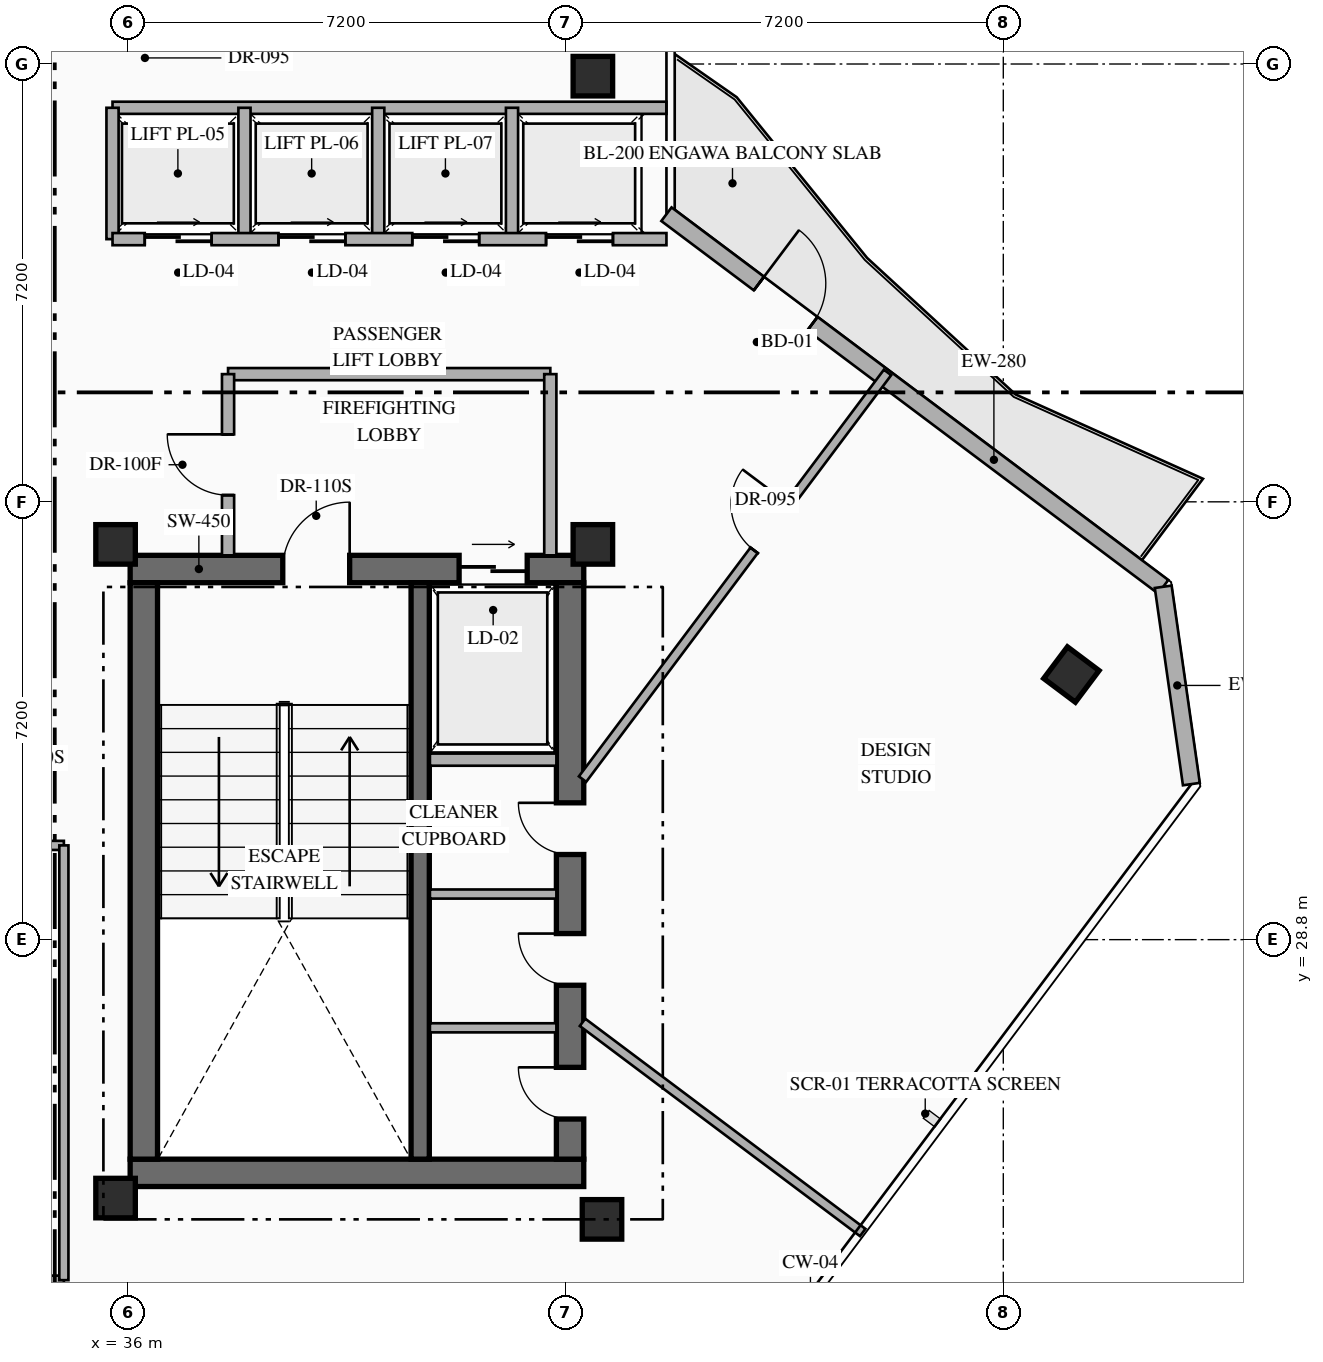
"""IFC4 building model, lengths in metres.
Left out: names, types, materials, properties, quantities, classifications, styles, units other than length and angle.
Written with IfcOpenShell. Run it as: python <this file> out.ifc"""

import sys

from ifc_helpers import new_model, si_unit, direction, frame, frame_2d, origin, origin_2d, place, context, subcontext, project, spatial, rectangle, hollow_rectangle, extrude, element, fill, save


model = new_model("IFC4")
c1 = context("Model", 3, precision=1e-05, world=origin(), true_north=direction((0.0, 1.0)))
c2 = subcontext(c1, "Body", "Model", "MODEL_VIEW")
j1 = project(units=[si_unit("LENGTHUNIT", "METRE"), si_unit("PLANEANGLEUNIT", "RADIAN")], contexts=[c1])
p1 = place(None, origin())
s1 = spatial("IfcSite", under=j1, at=p1, CompositionType="ELEMENT")
p2 = place(p1, origin())
s2 = spatial("IfcBuilding", under=s1, at=p2, CompositionType="ELEMENT")
p3 = place(p2, frame((0.0, 0.0, 250.35)))
s3 = spatial("IfcBuildingStorey", under=s2, at=p3, CompositionType="ELEMENT", Elevation=250.35)
p4 = place(p3, frame((36.04, 24.965, 0.0), z_axis=(0.0, 0.0, 1.0), x_axis=(1.0, 0.0, 0.0)))
e1 = element("IfcWall", 1, at=p4, inside=s3, PredefinedType="SHEAR", context=c2, shape_type="SweptSolid", body=[
    extrude(rectangle(XDim=7.46, YDim=0.45, at=frame_2d((3.73, 0.0))), origin(), (0.0, 0.0, 1.0), 3.6),
])
p5 = place(p3, frame((36.04, 34.895, 0.0), z_axis=(0.0, 0.0, 1.0), x_axis=(1.0, 0.0, 0.0)))
e2 = element("IfcWall", 2, at=p5, inside=s3, PredefinedType="SHEAR", context=c2, shape_type="SweptSolid", body=[
    extrude(rectangle(XDim=7.46, YDim=0.45, at=frame_2d((3.73, 0.0))), origin(), (0.0, 0.0, 1.0), 3.6),
])
p6 = place(p5, frame((2.51, 0.0, 0.0)))
e3 = element("IfcOpeningElement", 3, at=p6, cuts=e2, PredefinedType="OPENING", context=c2, shape_type="SweptSolid", body=[
    extrude(rectangle(XDim=1.1, YDim=2.2, at=frame_2d((0.55, 1.1))), frame((0.0, 0.235, 0.0), z_axis=(0.0, -1.0, 0.0), x_axis=(1.0, 0.0, 0.0)), (0.0, 0.0, 1.0), 0.47),
])
p7 = place(p5, frame((5.41, 0.0, 0.0)))
e4 = element("IfcOpeningElement", 4, at=p7, cuts=e2, PredefinedType="OPENING", context=c2, shape_type="SweptSolid", body=[
    extrude(rectangle(XDim=1.12, YDim=2.15, at=frame_2d((0.56, 1.075))), frame((0.0, 0.235, 0.0), z_axis=(0.0, -1.0, 0.0), x_axis=(1.0, 0.0, 0.0)), (0.0, 0.0, 1.0), 0.47),
])
p8 = place(p3, frame((36.265, 25.19, 0.0), z_axis=(0.0, 0.0, 1.0), x_axis=(0.0, 1.0, 0.0)))
e5 = element("IfcWall", 5, at=p8, inside=s3, PredefinedType="SHEAR", context=c2, shape_type="SweptSolid", body=[
    extrude(rectangle(XDim=9.48, YDim=0.45, at=frame_2d((4.74, 0.0))), origin(), (0.0, 0.0, 1.0), 3.6),
])
p9 = place(p3, frame((43.275, 25.19, 0.0), z_axis=(0.0, 0.0, 1.0), x_axis=(0.0, 1.0, 0.0)))
e6 = element("IfcWall", 6, at=p9, inside=s3, PredefinedType="SHEAR", context=c2, shape_type="SweptSolid", body=[
    extrude(rectangle(XDim=9.48, YDim=0.45, at=frame_2d((4.74, 0.0))), origin(), (0.0, 0.0, 1.0), 3.6),
])
p10 = place(p9, frame((0.66, 0.0, 0.0)))
e7 = element("IfcOpeningElement", 7, at=p10, cuts=e6, PredefinedType="OPENING", context=c2, shape_type="SweptSolid", body=[
    extrude(rectangle(XDim=0.85, YDim=2.08, at=frame_2d((0.425, 1.04))), frame((0.0, 0.235, 0.0), z_axis=(0.0, -1.0, 0.0), x_axis=(1.0, 0.0, 0.0)), (0.0, 0.0, 1.0), 0.47),
])
p11 = place(p9, frame((2.86, 0.0, 0.0)))
e8 = element("IfcOpeningElement", 8, at=p11, cuts=e6, PredefinedType="OPENING", context=c2, shape_type="SweptSolid", body=[
    extrude(rectangle(XDim=0.85, YDim=2.08, at=frame_2d((0.425, 1.04))), frame((0.0, 0.235, 0.0), z_axis=(0.0, -1.0, 0.0), x_axis=(1.0, 0.0, 0.0)), (0.0, 0.0, 1.0), 0.47),
])
p12 = place(p9, frame((5.01, 0.0, 0.0)))
e9 = element("IfcOpeningElement", 9, at=p12, cuts=e6, PredefinedType="OPENING", context=c2, shape_type="SweptSolid", body=[
    extrude(rectangle(XDim=0.85, YDim=2.08, at=frame_2d((0.425, 1.04))), frame((0.0, 0.235, 0.0), z_axis=(0.0, -1.0, 0.0), x_axis=(1.0, 0.0, 0.0)), (0.0, 0.0, 1.0), 0.47),
])
p13 = place(p3, frame((40.81, 25.19, 0.0), z_axis=(0.0, 0.0, 1.0), x_axis=(0.0, 1.0, 0.0)))
e10 = element("IfcWall", 10, at=p13, inside=s3, PredefinedType="SHEAR", context=c2, shape_type="SweptSolid", body=[
    extrude(rectangle(XDim=9.48, YDim=0.3, at=frame_2d((4.74, 0.0))), origin(), (0.0, 0.0, 1.0), 3.6),
])
for number, where, z_axis, x_axis in (
    (11, (35.8, 24.55, 0.0), (0.0, 0.0, 1.0), (1.0, 0.0, 0.0)),
    (12, (43.8, 24.2, 0.0), (0.0, 0.0, 1.0), (1.0, 0.0, 0.0)),
    (13, (35.8, 35.3, 0.0), (0.0, 0.0, 1.0), (1.0, 0.0, 0.0)),
    (14, (43.65, 35.3, 0.0), (0.0, 0.0, 1.0), (1.0, 0.0, 0.0)),
    (15, (43.65, 43.0, 0.0), (0.0, 0.0, 1.0), (1.0, 0.0, 0.0)),
    (16, (51.52, 33.16, 0.0), (0.0, 0.0, 1.0), (0.8, -0.6, 0.0)),
):
    element("IfcColumn", number, at=place(p3, frame(where, z_axis=z_axis, x_axis=x_axis)), inside=s3, PredefinedType="COLUMN", context=c2, shape_type="SweptSolid", body=[
        extrude(hollow_rectangle(XDim=0.65, YDim=0.65, WallThickness=0.025, at=origin_2d()), origin(), (0.0, 0.0, 1.0), 3.6),
    ])
p14 = place(p3, frame((44.86, 40.73, 0.0), z_axis=(0.0, 0.0, 1.0), x_axis=(0.800022950109, -0.599969398635, 0.0)))
e17 = element("IfcWall", 17, at=p14, inside=s3, PredefinedType="STANDARD", context=c2, shape_type="SweptSolid", body=[
    extrude(rectangle(XDim=10.212, YDim=0.28, at=frame_2d((5.106, 0.0))), origin(), (0.0, 0.0, 1.0), 3.35),
])
p15 = place(p14, frame((1.901, 0.0, 0.0)))
e18 = element("IfcOpeningElement", 18, at=p15, cuts=e17, PredefinedType="OPENING", context=c2, shape_type="SweptSolid", body=[
    extrude(rectangle(XDim=1.1, YDim=2.2, at=frame_2d((0.55, 1.1))), frame((0.0, 0.15, 0.0), z_axis=(0.0, -1.0, 0.0), x_axis=(1.0, 0.0, 0.0)), (0.0, 0.0, 1.0), 0.3),
])
p16 = place(p3, frame((53.03, 34.603, 0.0), z_axis=(0.0, 0.0, 1.0), x_axis=(0.141212810973, -0.989979263428, 0.0)))
e19 = element("IfcWall", 19, at=p16, inside=s3, PredefinedType="STANDARD", context=c2, shape_type="SweptSolid", body=[
    extrude(rectangle(XDim=3.278, YDim=0.28, at=frame_2d((1.639, 0.0))), origin(), (0.0, 0.0, 1.0), 3.35),
])
p17 = place(p3, frame((40.97, 31.76, 0.0), z_axis=(0.0, 0.0, 1.0), x_axis=(1.0, 0.0, 0.0)))
e20 = element("IfcWall", 20, at=p17, inside=s3, PredefinedType="STANDARD", context=c2, shape_type="SweptSolid", body=[
    extrude(rectangle(XDim=2.08, YDim=0.2, at=frame_2d((1.04, 0.0))), origin(), (0.0, 0.0, 1.0), 3.35),
])
for number, where, z_axis, x_axis in (
    (21, (40.97, 27.35, 0.0), (0.0, 0.0, 1.0), (1.0, 0.0, 0.0)),
    (22, (40.97, 29.55, 0.0), (0.0, 0.0, 1.0), (1.0, 0.0, 0.0)),
):
    element("IfcWall", number, at=place(p3, frame(where, z_axis=z_axis, x_axis=x_axis)), inside=s3, PredefinedType="PARTITIONING", context=c2, shape_type="SweptSolid", body=[
        extrude(rectangle(XDim=2.08, YDim=0.15, at=frame_2d((1.04, 0.0))), origin(), (0.0, 0.0, 1.0), 3.35),
    ])
p18 = place(p3, frame((37.65, 38.1, 0.0), z_axis=(0.0, 0.0, 1.0), x_axis=(1.0, 0.0, 0.0)))
e23 = element("IfcWall", 23, at=p18, inside=s3, PredefinedType="STANDARD", context=c2, shape_type="SweptSolid", body=[
    extrude(rectangle(XDim=5.3, YDim=0.2, at=frame_2d((2.65, 0.0))), origin(), (0.0, 0.0, 1.0), 3.35),
])
p19 = place(p3, frame((42.95, 35.12, 0.0), z_axis=(0.0, 0.0, 1.0), x_axis=(0.0, 1.0, 0.0)))
e24 = element("IfcWall", 24, at=p19, inside=s3, PredefinedType="STANDARD", context=c2, shape_type="SweptSolid", body=[
    extrude(rectangle(XDim=2.98, YDim=0.2, at=frame_2d((1.49, 0.0))), origin(), (0.0, 0.0, 1.0), 3.35),
])
p20 = place(p3, frame((37.65, 35.12, 0.0), z_axis=(0.0, 0.0, 1.0), x_axis=(0.0, 1.0, 0.0)))
e25 = element("IfcWall", 25, at=p20, inside=s3, PredefinedType="STANDARD", context=c2, shape_type="SweptSolid", body=[
    extrude(rectangle(XDim=2.98, YDim=0.2, at=frame_2d((1.49, 0.0))), origin(), (0.0, 0.0, 1.0), 3.35),
])
p21 = place(p20, frame((0.99, 0.0, 0.0)))
e26 = element("IfcOpeningElement", 26, at=p21, cuts=e25, PredefinedType="OPENING", context=c2, shape_type="SweptSolid", body=[
    extrude(rectangle(XDim=1.0, YDim=2.2, at=frame_2d((0.5, 1.1))), frame((0.0, 0.11, 0.0), z_axis=(0.0, -1.0, 0.0), x_axis=(1.0, 0.0, 0.0)), (0.0, 0.0, 1.0), 0.22),
])
p22 = place(p3, frame((35.75, 42.48, 0.0), z_axis=(0.0, 0.0, 1.0), x_axis=(1.0, 0.0, 0.0)))
e27 = element("IfcWall", 27, at=p22, inside=s3, PredefinedType="STANDARD", context=c2, shape_type="SweptSolid", body=[
    extrude(rectangle(XDim=9.11, YDim=0.2, at=frame_2d((4.555, 0.0))), origin(), (0.0, 0.0, 1.0), 3.35),
])
for number, where, z_axis, x_axis in (
    (28, (35.75, 40.32, 0.0), (0.0, 0.0, 1.0), (0.0, 1.0, 0.0)),
    (29, (37.92, 40.32, 0.0), (0.0, 0.0, 1.0), (0.0, 1.0, 0.0)),
    (30, (40.12, 40.32, 0.0), (0.0, 0.0, 1.0), (0.0, 1.0, 0.0)),
    (31, (42.32, 40.32, 0.0), (0.0, 0.0, 1.0), (0.0, 1.0, 0.0)),
):
    element("IfcWall", number, at=place(p3, frame(where, z_axis=z_axis, x_axis=x_axis)), inside=s3, PredefinedType="STANDARD", context=c2, shape_type="SweptSolid", body=[
        extrude(rectangle(XDim=2.16, YDim=0.2, at=frame_2d((1.08, 0.0))), origin(), (0.0, 0.0, 1.0), 3.35),
    ])
p23 = place(p3, frame((35.75, 40.32, 0.0), z_axis=(0.0, 0.0, 1.0), x_axis=(1.0, 0.0, 0.0)))
e32 = element("IfcWall", 32, at=p23, inside=s3, PredefinedType="STANDARD", context=c2, shape_type="SweptSolid", body=[
    extrude(rectangle(XDim=9.11, YDim=0.2, at=frame_2d((4.555, 0.0))), origin(), (0.0, 0.0, 1.0), 3.35),
])
p24 = place(p23, frame((0.53, 0.0, 0.0)))
e33 = element("IfcOpeningElement", 33, at=p24, cuts=e32, PredefinedType="OPENING", context=c2, shape_type="SweptSolid", body=[
    extrude(rectangle(XDim=1.1, YDim=2.18, at=frame_2d((0.55, 1.09))), frame((0.0, 0.11, 0.0), z_axis=(0.0, -1.0, 0.0), x_axis=(1.0, 0.0, 0.0)), (0.0, 0.0, 1.0), 0.22),
])
p25 = place(p23, frame((2.73, 0.0, 0.0)))
e34 = element("IfcOpeningElement", 34, at=p25, cuts=e32, PredefinedType="OPENING", context=c2, shape_type="SweptSolid", body=[
    extrude(rectangle(XDim=1.1, YDim=2.18, at=frame_2d((0.55, 1.09))), frame((0.0, 0.11, 0.0), z_axis=(0.0, -1.0, 0.0), x_axis=(1.0, 0.0, 0.0)), (0.0, 0.0, 1.0), 0.22),
])
p26 = place(p23, frame((4.93, 0.0, 0.0)))
e35 = element("IfcOpeningElement", 35, at=p26, cuts=e32, PredefinedType="OPENING", context=c2, shape_type="SweptSolid", body=[
    extrude(rectangle(XDim=1.1, YDim=2.18, at=frame_2d((0.55, 1.09))), frame((0.0, 0.11, 0.0), z_axis=(0.0, -1.0, 0.0), x_axis=(1.0, 0.0, 0.0)), (0.0, 0.0, 1.0), 0.22),
])
p27 = place(p23, frame((7.13, 0.0, 0.0)))
e36 = element("IfcOpeningElement", 36, at=p27, cuts=e32, PredefinedType="OPENING", context=c2, shape_type="SweptSolid", body=[
    extrude(rectangle(XDim=1.1, YDim=2.18, at=frame_2d((0.55, 1.09))), frame((0.0, 0.11, 0.0), z_axis=(0.0, -1.0, 0.0), x_axis=(1.0, 0.0, 0.0)), (0.0, 0.0, 1.0), 0.22),
])
p28 = place(p3, frame((25.55, 23.2, 0.0), z_axis=(0.0, 0.0, 1.0), x_axis=(1.0, 0.0, 0.0)))
e37 = element("IfcWall", 37, at=p28, inside=s3, PredefinedType="PARTITIONING", context=c2, shape_type="SweptSolid", body=[
    extrude(rectangle(XDim=9.4, YDim=0.15, at=frame_2d((4.7, 0.0))), origin(), (0.0, 0.0, 1.0), 3.35),
])
p29 = place(p3, frame((25.55, 30.35, 0.0), z_axis=(0.0, 0.0, 1.0), x_axis=(1.0, 0.0, 0.0)))
e38 = element("IfcWall", 38, at=p29, inside=s3, PredefinedType="PARTITIONING", context=c2, shape_type="SweptSolid", body=[
    extrude(rectangle(XDim=9.4, YDim=0.15, at=frame_2d((4.7, 0.0))), origin(), (0.0, 0.0, 1.0), 3.35),
])
p30 = place(p29, frame((7.638, 0.0, 0.0)))
e39 = element("IfcOpeningElement", 39, at=p30, cuts=e38, PredefinedType="OPENING", context=c2, shape_type="SweptSolid", body=[
    extrude(rectangle(XDim=1.0, YDim=2.15, at=frame_2d((0.5, 1.075))), frame((0.0, 0.085, 0.0), z_axis=(0.0, -1.0, 0.0), x_axis=(1.0, 0.0, 0.0)), (0.0, 0.0, 1.0), 0.17),
])
p31 = place(p3, frame((34.95, 23.2, 0.0), z_axis=(0.0, 0.0, 1.0), x_axis=(0.0, 1.0, 0.0)))
e40 = element("IfcWall", 40, at=p31, inside=s3, PredefinedType="PARTITIONING", context=c2, shape_type="SweptSolid", body=[
    extrude(rectangle(XDim=7.15, YDim=0.15, at=frame_2d((3.575, 0.0))), origin(), (0.0, 0.0, 1.0), 3.35),
])
p32 = place(p3, frame((43.48, 27.44, 0.0), z_axis=(0.0, 0.0, 1.0), x_axis=(0.79998982729, -0.600013563374, 0.0)))
e41 = element("IfcWall", 41, at=p32, inside=s3, PredefinedType="PARTITIONING", context=c2, shape_type="SweptSolid", body=[
    extrude(rectangle(XDim=5.76, YDim=0.15, at=frame_2d((2.88, 0.0))), origin(), (0.0, 0.0, 1.0), 3.35),
])
p33 = place(p3, frame((43.48, 31.44, 0.0), z_axis=(0.0, 0.0, 1.0), x_axis=(0.600009344989, 0.799992991173, 0.0)))
e42 = element("IfcWall", 42, at=p33, inside=s3, PredefinedType="PARTITIONING", context=c2, shape_type="SweptSolid", body=[
    extrude(rectangle(XDim=8.36, YDim=0.15, at=frame_2d((4.18, 0.0))), origin(), (0.0, 0.0, 1.0), 3.35),
])
p34 = place(p33, frame((4.703, 0.0, 0.0)))
e43 = element("IfcOpeningElement", 43, at=p34, cuts=e42, PredefinedType="OPENING", context=c2, shape_type="SweptSolid", body=[
    extrude(rectangle(XDim=0.95, YDim=2.15, at=frame_2d((0.475, 1.075))), frame((0.0, 0.085, 0.0), z_axis=(0.0, -1.0, 0.0), x_axis=(1.0, 0.0, 0.0)), (0.0, 0.0, 1.0), 0.17),
])
p35 = place(p3, frame((27.91, 26.68, 0.0), z_axis=(0.0, 0.0, 1.0), x_axis=(0.8, -0.6, 0.0)))
e44 = element("IfcWall", 44, at=p35, inside=s3, PredefinedType="PARTITIONING", context=c2, shape_type="SweptSolid", body=[
    extrude(rectangle(XDim=17.76, YDim=0.15, at=frame_2d((8.88, 0.0))), origin(), (0.0, 0.0, 1.0), 3.35),
])
p36 = place(p35, frame((11.294, 0.0, 0.0)))
e45 = element("IfcOpeningElement", 45, at=p36, cuts=e44, PredefinedType="OPENING", context=c2, shape_type="SweptSolid", body=[
    extrude(rectangle(XDim=0.95, YDim=2.15, at=frame_2d((0.475, 1.075))), frame((0.0, 0.085, 0.0), z_axis=(0.0, -1.0, 0.0), x_axis=(1.0, 0.0, 0.0)), (0.0, 0.0, 1.0), 0.17),
])
p37 = place(p15, origin())
e46 = element("IfcDoor", 46, at=p37, inside=s3, OperationType="SINGLE_SWING_LEFT", PredefinedType="DOOR", context=c2, shape_type="SweptSolid", body=[
    extrude(rectangle(XDim=1.1, YDim=2.2, at=frame_2d((0.55, 1.1))), frame((0.0, 0.025, 0.0), z_axis=(0.0, -1.0, 0.0), x_axis=(1.0, 0.0, 0.0)), (0.0, 0.0, 1.0), 0.05),
])
fill(e18, e46)
p38 = place(p6, origin())
e47 = element("IfcDoor", 47, at=p38, inside=s3, OperationType="SINGLE_SWING_RIGHT", PredefinedType="DOOR", context=c2, shape_type="SweptSolid", body=[
    extrude(rectangle(XDim=1.1, YDim=2.2, at=frame_2d((0.55, 1.1))), frame((0.0, 0.025, 0.0), z_axis=(0.0, -1.0, 0.0), x_axis=(1.0, 0.0, 0.0)), (0.0, 0.0, 1.0), 0.05),
])
fill(e3, e47)
p39 = place(p7, origin())
e48 = element("IfcDoor", 48, at=p39, inside=s3, OperationType="SLIDING_TO_RIGHT", PredefinedType="USERDEFINED", context=c2, shape_type="SweptSolid", body=[
    extrude(rectangle(XDim=1.12, YDim=2.15, at=frame_2d((0.56, 1.075))), frame((0.0, 0.025, 0.0), z_axis=(0.0, -1.0, 0.0), x_axis=(1.0, 0.0, 0.0)), (0.0, 0.0, 1.0), 0.05),
])
fill(e4, e48)
p40 = place(p10, origin())
e49 = element("IfcDoor", 49, at=p40, inside=s3, OperationType="SINGLE_SWING_RIGHT", PredefinedType="DOOR", context=c2, shape_type="SweptSolid", body=[
    extrude(rectangle(XDim=0.85, YDim=2.08, at=frame_2d((0.425, 1.04))), frame((0.0, 0.025, 0.0), z_axis=(0.0, -1.0, 0.0), x_axis=(1.0, 0.0, 0.0)), (0.0, 0.0, 1.0), 0.05),
])
fill(e7, e49)
p41 = place(p11, origin())
e50 = element("IfcDoor", 50, at=p41, inside=s3, OperationType="SINGLE_SWING_RIGHT", PredefinedType="DOOR", context=c2, shape_type="SweptSolid", body=[
    extrude(rectangle(XDim=0.85, YDim=2.08, at=frame_2d((0.425, 1.04))), frame((0.0, 0.025, 0.0), z_axis=(0.0, -1.0, 0.0), x_axis=(1.0, 0.0, 0.0)), (0.0, 0.0, 1.0), 0.05),
])
fill(e8, e50)
p42 = place(p12, origin())
e51 = element("IfcDoor", 51, at=p42, inside=s3, OperationType="SINGLE_SWING_RIGHT", PredefinedType="DOOR", context=c2, shape_type="SweptSolid", body=[
    extrude(rectangle(XDim=0.85, YDim=2.08, at=frame_2d((0.425, 1.04))), frame((0.0, 0.025, 0.0), z_axis=(0.0, -1.0, 0.0), x_axis=(1.0, 0.0, 0.0)), (0.0, 0.0, 1.0), 0.05),
])
fill(e9, e51)
p43 = place(p21, origin())
e52 = element("IfcDoor", 52, at=p43, inside=s3, OperationType="SINGLE_SWING_RIGHT", PredefinedType="DOOR", context=c2, shape_type="SweptSolid", body=[
    extrude(rectangle(XDim=1.0, YDim=2.2, at=frame_2d((0.5, 1.1))), frame((0.0, 0.025, 0.0), z_axis=(0.0, -1.0, 0.0), x_axis=(1.0, 0.0, 0.0)), (0.0, 0.0, 1.0), 0.05),
])
fill(e26, e52)
p44 = place(p24, origin())
e53 = element("IfcDoor", 53, at=p44, inside=s3, OperationType="SLIDING_TO_RIGHT", PredefinedType="USERDEFINED", context=c2, shape_type="SweptSolid", body=[
    extrude(rectangle(XDim=1.1, YDim=2.18, at=frame_2d((0.55, 1.09))), frame((0.0, 0.025, 0.0), z_axis=(0.0, -1.0, 0.0), x_axis=(1.0, 0.0, 0.0)), (0.0, 0.0, 1.0), 0.05),
])
fill(e33, e53)
p45 = place(p25, origin())
e54 = element("IfcDoor", 54, at=p45, inside=s3, OperationType="SLIDING_TO_RIGHT", PredefinedType="USERDEFINED", context=c2, shape_type="SweptSolid", body=[
    extrude(rectangle(XDim=1.1, YDim=2.18, at=frame_2d((0.55, 1.09))), frame((0.0, 0.025, 0.0), z_axis=(0.0, -1.0, 0.0), x_axis=(1.0, 0.0, 0.0)), (0.0, 0.0, 1.0), 0.05),
])
fill(e34, e54)
p46 = place(p26, origin())
e55 = element("IfcDoor", 55, at=p46, inside=s3, OperationType="SLIDING_TO_RIGHT", PredefinedType="USERDEFINED", context=c2, shape_type="SweptSolid", body=[
    extrude(rectangle(XDim=1.1, YDim=2.18, at=frame_2d((0.55, 1.09))), frame((0.0, 0.025, 0.0), z_axis=(0.0, -1.0, 0.0), x_axis=(1.0, 0.0, 0.0)), (0.0, 0.0, 1.0), 0.05),
])
fill(e35, e55)
p47 = place(p27, origin())
e56 = element("IfcDoor", 56, at=p47, inside=s3, OperationType="SLIDING_TO_RIGHT", PredefinedType="USERDEFINED", context=c2, shape_type="SweptSolid", body=[
    extrude(rectangle(XDim=1.1, YDim=2.18, at=frame_2d((0.55, 1.09))), frame((0.0, 0.025, 0.0), z_axis=(0.0, -1.0, 0.0), x_axis=(1.0, 0.0, 0.0)), (0.0, 0.0, 1.0), 0.05),
])
fill(e36, e56)
p48 = place(p34, origin())
e57 = element("IfcDoor", 57, at=p48, inside=s3, OperationType="SINGLE_SWING_RIGHT", PredefinedType="DOOR", context=c2, shape_type="SweptSolid", body=[
    extrude(rectangle(XDim=0.95, YDim=2.15, at=frame_2d((0.475, 1.075))), frame((0.0, 0.025, 0.0), z_axis=(0.0, -1.0, 0.0), x_axis=(1.0, 0.0, 0.0)), (0.0, 0.0, 1.0), 0.05),
])
fill(e43, e57)
save(model, sys.argv[1])
